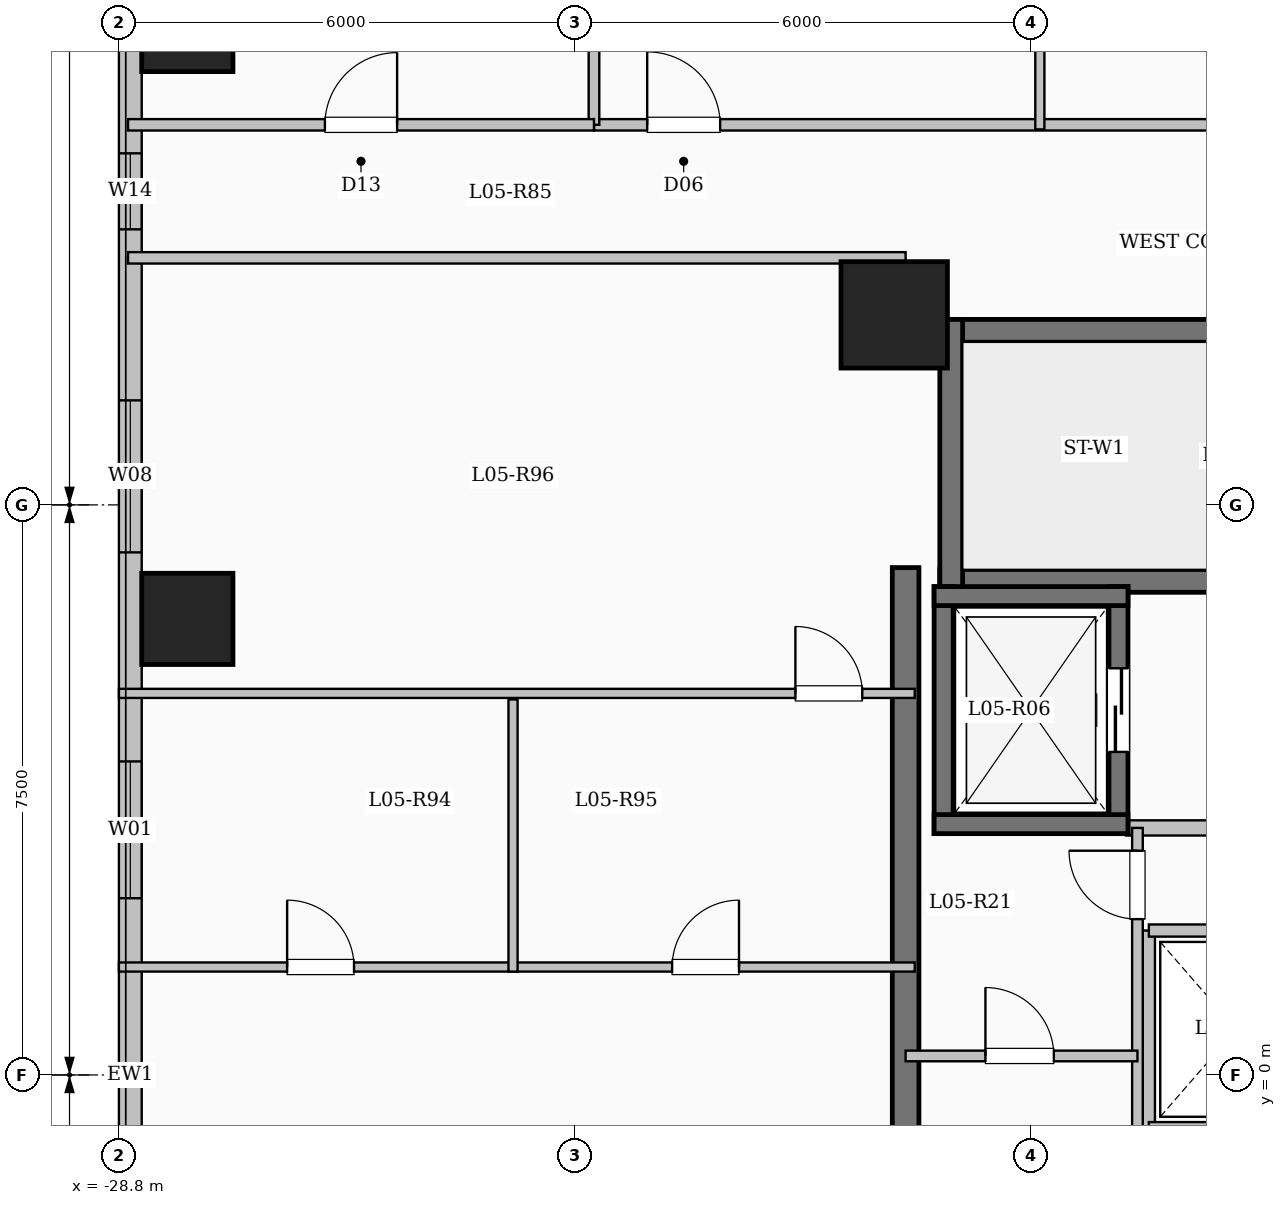
"""IFC4 building model, lengths in metres.
Left out: names, types, materials, properties, quantities, classifications, styles, units other than length and angle.
Written with IfcOpenShell. Run it as: python <this file> out.ifc"""

import sys

from ifc_helpers import new_model, si_unit, direction, frame, frame_2d, origin, origin_2d, place, context, subcontext, project, spatial, rectangle, extrude, element, fill, save


model = new_model("IFC4")
c1 = context("Model", 3, precision=1e-05, world=origin(), true_north=direction((0.0, 1.0)))
c2 = subcontext(c1, "Body", "Model", "MODEL_VIEW")
j1 = project(units=[si_unit("LENGTHUNIT", "METRE"), si_unit("PLANEANGLEUNIT", "RADIAN")], contexts=[c1])
p1 = place(None, origin())
s1 = spatial("IfcSite", under=j1, at=p1, CompositionType="ELEMENT")
p2 = place(p1, origin())
s2 = spatial("IfcBuilding", under=s1, at=p2, CompositionType="ELEMENT")
p3 = place(p2, frame((0.0, 0.0, 24.0)))
s3 = spatial("IfcBuildingStorey", under=s2, at=p3, CompositionType="ELEMENT", Elevation=24.0)
p4 = place(p3, frame((-18.6, 10.0, 0.0), z_axis=(0.0, 0.0, 1.0), x_axis=(1.0, 0.0, 0.0)))
e1 = element("IfcColumn", 1, at=p4, inside=s3, PredefinedType="COLUMN", context=c2, shape_type="SweptSolid", body=[
    extrude(rectangle(XDim=1.4, YDim=1.4, at=origin_2d()), origin(), (0.0, 0.0, 1.0), 3.35),
])
for number, where, z_axis, x_axis in (
    (2, (-27.9, 6.0, 0.0), (0.0, 0.0, 1.0), (1.0, 0.0, 0.0)),
    (3, (-27.9, 13.8, 0.0), (0.0, 0.0, 1.0), (1.0, 0.0, 0.0)),
):
    element("IfcColumn", number, at=place(p3, frame(where, z_axis=z_axis, x_axis=x_axis)), inside=s3, PredefinedType="COLUMN", context=c2, shape_type="SweptSolid", body=[
        extrude(rectangle(XDim=1.2, YDim=1.2, at=origin_2d()), origin(), (0.0, 0.0, 1.0), 3.35),
    ])
p5 = place(p3, frame((-28.65, -19.05, 0.0), z_axis=(0.0, 0.0, 1.0), x_axis=(0.0, 1.0, 0.0)))
e4 = element("IfcWall", 4, at=p5, inside=s3, PredefinedType="SOLIDWALL", context=c2, shape_type="SweptSolid", body=[
    extrude(rectangle(XDim=38.1, YDim=0.3, at=frame_2d((19.05, 0.0))), origin(), (0.0, 0.0, 1.0), 3.1),
])
p6 = place(p5, frame((3.15, 0.0, 0.9)))
e5 = element("IfcOpeningElement", 5, at=p6, cuts=e4, PredefinedType="OPENING", context=c2, shape_type="SweptSolid", body=[
    extrude(rectangle(XDim=2.4, YDim=1.8, at=frame_2d((1.2, 0.9))), frame((0.0, 0.16, 0.0), z_axis=(0.0, -1.0, 0.0), x_axis=(1.0, 0.0, 0.0)), (0.0, 0.0, 1.0), 0.32),
])
p7 = place(p5, frame((9.542, 0.0, 0.9)))
e6 = element("IfcOpeningElement", 6, at=p7, cuts=e4, PredefinedType="OPENING", context=c2, shape_type="SweptSolid", body=[
    extrude(rectangle(XDim=1.5, YDim=1.65, at=frame_2d((0.75, 0.825))), frame((0.0, 0.16, 0.0), z_axis=(0.0, -1.0, 0.0), x_axis=(1.0, 0.0, 0.0)), (0.0, 0.0, 1.0), 0.32),
])
p8 = place(p5, frame((14.95, 0.0, 0.9)))
e7 = element("IfcOpeningElement", 7, at=p8, cuts=e4, PredefinedType="OPENING", context=c2, shape_type="SweptSolid", body=[
    extrude(rectangle(XDim=2.4, YDim=1.8, at=frame_2d((1.2, 0.9))), frame((0.0, 0.16, 0.0), z_axis=(0.0, -1.0, 0.0), x_axis=(1.0, 0.0, 0.0)), (0.0, 0.0, 1.0), 0.32),
])
p9 = place(p5, frame((21.375, 0.0, 0.9)))
e8 = element("IfcOpeningElement", 8, at=p9, cuts=e4, PredefinedType="OPENING", context=c2, shape_type="SweptSolid", body=[
    extrude(rectangle(XDim=1.8, YDim=1.65, at=frame_2d((0.9, 0.825))), frame((0.0, 0.16, 0.0), z_axis=(0.0, -1.0, 0.0), x_axis=(1.0, 0.0, 0.0)), (0.0, 0.0, 1.0), 0.32),
])
p10 = place(p5, frame((25.925, 0.0, 0.9)))
e9 = element("IfcOpeningElement", 9, at=p10, cuts=e4, PredefinedType="OPENING", context=c2, shape_type="SweptSolid", body=[
    extrude(rectangle(XDim=2.0, YDim=1.7, at=frame_2d((1.0, 0.85))), frame((0.0, 0.16, 0.0), z_axis=(0.0, -1.0, 0.0), x_axis=(1.0, 0.0, 0.0)), (0.0, 0.0, 1.0), 0.32),
])
p11 = place(p5, frame((30.175, 0.0, 0.95)))
e10 = element("IfcOpeningElement", 10, at=p11, cuts=e4, PredefinedType="OPENING", context=c2, shape_type="SweptSolid", body=[
    extrude(rectangle(XDim=1.0, YDim=1.5, at=frame_2d((0.5, 0.75))), frame((0.0, 0.16, 0.0), z_axis=(0.0, -1.0, 0.0), x_axis=(1.0, 0.0, 0.0)), (0.0, 0.0, 1.0), 0.32),
])
p12 = place(p5, frame((33.85, 0.0, 0.9)))
e11 = element("IfcOpeningElement", 11, at=p12, cuts=e4, PredefinedType="OPENING", context=c2, shape_type="SweptSolid", body=[
    extrude(rectangle(XDim=2.0, YDim=1.7, at=frame_2d((1.0, 0.85))), frame((0.0, 0.16, 0.0), z_axis=(0.0, -1.0, 0.0), x_axis=(1.0, 0.0, 0.0)), (0.0, 0.0, 1.0), 0.32),
])
p13 = place(p3, frame((-18.0, 9.79, 0.0), z_axis=(0.0, 0.0, 1.0), x_axis=(1.0, 0.0, 0.0)))
e12 = element("IfcWall", 12, at=p13, inside=s3, PredefinedType="SHEAR", context=c2, shape_type="SweptSolid", body=[
    extrude(rectangle(XDim=8.0, YDim=0.3, at=frame_2d((4.0, 0.0))), origin(), (0.0, 0.0, 1.0), 3.35),
])
p14 = place(p3, frame((-18.0, 6.5, 0.0), z_axis=(0.0, 0.0, 1.0), x_axis=(1.0, 0.0, 0.0)))
e13 = element("IfcWall", 13, at=p14, inside=s3, PredefinedType="SHEAR", context=c2, shape_type="SweptSolid", body=[
    extrude(rectangle(XDim=8.0, YDim=0.3, at=frame_2d((4.0, 0.0))), origin(), (0.0, 0.0, 1.0), 3.35),
])
p15 = place(p14, frame((6.45, 0.0, 0.0)))
e14 = element("IfcOpeningElement", 14, at=p15, cuts=e13, PredefinedType="OPENING", context=c2, shape_type="SweptSolid", body=[
    extrude(rectangle(XDim=1.0, YDim=2.15, at=frame_2d((0.5, 1.075))), frame((0.0, 0.16, 0.0), z_axis=(0.0, -1.0, 0.0), x_axis=(1.0, 0.0, 0.0)), (0.0, 0.0, 1.0), 0.32),
])
p16 = place(p3, frame((-17.85, 6.35, 0.0), z_axis=(0.0, 0.0, 1.0), x_axis=(0.0, 1.0, 0.0)))
e15 = element("IfcWall", 15, at=p16, inside=s3, PredefinedType="SHEAR", context=c2, shape_type="SweptSolid", body=[
    extrude(rectangle(XDim=3.59, YDim=0.3, at=frame_2d((1.795, 0.0))), origin(), (0.0, 0.0, 1.0), 3.35),
])
p17 = place(p3, frame((-15.55, 3.25, 0.0), z_axis=(0.0, 0.0, 1.0), x_axis=(1.0, 0.0, 0.0)))
e16 = element("IfcWall", 16, at=p17, inside=s3, PredefinedType="SOLIDWALL", context=c2, shape_type="SweptSolid", body=[
    extrude(rectangle(XDim=5.4, YDim=0.2, at=frame_2d((2.7, 0.0))), origin(), (0.0, 0.0, 1.0), 3.1),
])
p18 = place(p3, frame((-17.95, 3.175, 0.0), z_axis=(0.0, 0.0, 1.0), x_axis=(0.0, 1.0, 0.0)))
e17 = element("IfcWall", 17, at=p18, inside=s3, PredefinedType="SHEAR", context=c2, shape_type="SweptSolid", body=[
    extrude(rectangle(XDim=3.25, YDim=0.25, at=frame_2d((1.625, 0.0))), origin(), (0.0, 0.0, 1.0), 3.35),
])
p19 = place(p3, frame((-15.65, 3.175, 0.0), z_axis=(0.0, 0.0, 1.0), x_axis=(0.0, 1.0, 0.0)))
e18 = element("IfcWall", 18, at=p19, inside=s3, PredefinedType="SHEAR", context=c2, shape_type="SweptSolid", body=[
    extrude(rectangle(XDim=3.25, YDim=0.25, at=frame_2d((1.625, 0.0))), origin(), (0.0, 0.0, 1.0), 3.35),
])
p20 = place(p19, frame((1.075, 0.0, 0.0)))
e19 = element("IfcOpeningElement", 19, at=p20, cuts=e18, PredefinedType="OPENING", context=c2, shape_type="SweptSolid", body=[
    extrude(rectangle(XDim=1.1, YDim=2.15, at=frame_2d((0.55, 1.075))), frame((0.0, 0.135, 0.0), z_axis=(0.0, -1.0, 0.0), x_axis=(1.0, 0.0, 0.0)), (0.0, 0.0, 1.0), 0.27),
])
for number, where, z_axis, x_axis in (
    (20, (-18.075, 3.3, 0.0), (0.0, 0.0, 1.0), (1.0, 0.0, 0.0)),
    (21, (-18.075, 6.3, 0.0), (0.0, 0.0, 1.0), (1.0, 0.0, 0.0)),
):
    element("IfcWall", number, at=place(p3, frame(where, z_axis=z_axis, x_axis=x_axis)), inside=s3, PredefinedType="SHEAR", context=c2, shape_type="SweptSolid", body=[
        extrude(rectangle(XDim=2.55, YDim=0.25, at=frame_2d((1.275, 0.0))), origin(), (0.0, 0.0, 1.0), 3.35),
    ])
p21 = place(p3, frame((-15.25, -0.7, 0.0), z_axis=(0.0, 0.0, 1.0), x_axis=(0.0, 1.0, 0.0)))
e22 = element("IfcWall", 22, at=p21, inside=s3, PredefinedType="SOLIDWALL", context=c2, shape_type="SweptSolid", body=[
    extrude(rectangle(XDim=2.6, YDim=0.16, at=frame_2d((1.3, 0.0))), origin(), (0.0, 0.0, 1.0), 3.1),
])
for number, where, z_axis, x_axis in (
    (23, (-15.25, -0.7, 0.0), (0.0, 0.0, 1.0), (1.0, 0.0, 0.0)),
    (24, (-15.25, 1.9, 0.0), (0.0, 0.0, 1.0), (1.0, 0.0, 0.0)),
):
    element("IfcWall", number, at=place(p3, frame(where, z_axis=z_axis, x_axis=x_axis)), inside=s3, PredefinedType="SOLIDWALL", context=c2, shape_type="SweptSolid", body=[
        extrude(rectangle(XDim=2.3, YDim=0.16, at=frame_2d((1.15, 0.0))), origin(), (0.0, 0.0, 1.0), 3.1),
    ])
p22 = place(p3, frame((-18.45, -7.375, 0.0), z_axis=(0.0, 0.0, 1.0), x_axis=(0.0, 1.0, 0.0)))
e25 = element("IfcWall", 25, at=p22, inside=s3, PredefinedType="SHEAR", context=c2, shape_type="SweptSolid", body=[
    extrude(rectangle(XDim=14.05, YDim=0.35, at=frame_2d((7.025, 0.0))), origin(), (0.0, 0.0, 1.0), 3.35),
])
p23 = place(p3, frame((-15.4, -7.2, 0.0), z_axis=(0.0, 0.0, 1.0), x_axis=(0.0, 1.0, 0.0)))
e26 = element("IfcWall", 26, at=p23, inside=s3, PredefinedType="PARTITIONING", context=c2, shape_type="SweptSolid", body=[
    extrude(rectangle(XDim=10.45, YDim=0.14, at=frame_2d((5.225, 0.0))), origin(), (0.0, 0.0, 1.0), 3.1),
])
p24 = place(p23, frame((9.25, 0.0, 0.0)))
e27 = element("IfcOpeningElement", 27, at=p24, cuts=e26, PredefinedType="OPENING", context=c2, shape_type="SweptSolid", body=[
    extrude(rectangle(XDim=0.9, YDim=2.08, at=frame_2d((0.45, 1.04))), frame((0.0, 0.08, 0.0), z_axis=(0.0, -1.0, 0.0), x_axis=(1.0, 0.0, 0.0)), (0.0, 0.0, 1.0), 0.16),
])
p25 = place(p3, frame((-18.45, 0.25, 0.0), z_axis=(0.0, 0.0, 1.0), x_axis=(1.0, 0.0, 0.0)))
e28 = element("IfcWall", 28, at=p25, inside=s3, PredefinedType="PARTITIONING", context=c2, shape_type="SweptSolid", body=[
    extrude(rectangle(XDim=3.05, YDim=0.14, at=frame_2d((1.525, 0.0))), origin(), (0.0, 0.0, 1.0), 3.1),
])
p26 = place(p25, frame((1.05, 0.0, 0.0)))
e29 = element("IfcOpeningElement", 29, at=p26, cuts=e28, PredefinedType="OPENING", context=c2, shape_type="SweptSolid", body=[
    extrude(rectangle(XDim=0.9, YDim=2.08, at=frame_2d((0.45, 1.04))), frame((0.0, 0.08, 0.0), z_axis=(0.0, -1.0, 0.0), x_axis=(1.0, 0.0, 0.0)), (0.0, 0.0, 1.0), 0.16),
])
p27 = place(p3, frame((-22.55, 12.5, 0.0), z_axis=(0.0, 0.0, 1.0), x_axis=(1.0, 0.0, 0.0)))
e30 = element("IfcWall", 30, at=p27, inside=s3, PredefinedType="PARTITIONING", context=c2, shape_type="SweptSolid", body=[
    extrude(rectangle(XDim=18.7, YDim=0.15, at=frame_2d((9.35, 0.0))), origin(), (0.0, 0.0, 1.0), 3.1),
])
p28 = place(p27, frame((0.7, 0.0, 0.0)))
e31 = element("IfcOpeningElement", 31, at=p28, cuts=e30, PredefinedType="OPENING", context=c2, shape_type="SweptSolid", body=[
    extrude(rectangle(XDim=0.96, YDim=2.15, at=frame_2d((0.48, 1.075))), frame((0.0, 0.085, 0.0), z_axis=(0.0, -1.0, 0.0), x_axis=(1.0, 0.0, 0.0)), (0.0, 0.0, 1.0), 0.17),
])
p29 = place(p27, frame((11.326, 0.0, 0.0)))
e32 = element("IfcOpeningElement", 32, at=p29, cuts=e30, PredefinedType="OPENING", context=c2, shape_type="SweptSolid", body=[
    extrude(rectangle(XDim=0.96, YDim=2.15, at=frame_2d((0.48, 1.075))), frame((0.0, 0.085, 0.0), z_axis=(0.0, -1.0, 0.0), x_axis=(1.0, 0.0, 0.0)), (0.0, 0.0, 1.0), 0.17),
])
p30 = place(p3, frame((-16.684, 12.44, 0.0), z_axis=(0.0, 0.0, 1.0), x_axis=(0.0, 1.0, 0.0)))
e33 = element("IfcWall", 33, at=p30, inside=s3, PredefinedType="PARTITIONING", context=c2, shape_type="SweptSolid", body=[
    extrude(rectangle(XDim=3.21, YDim=0.12, at=frame_2d((1.605, 0.0))), origin(), (0.0, 0.0, 1.0), 3.1),
])
p31 = place(p30, frame((1.195, 0.0, 0.0)))
e34 = element("IfcOpeningElement", 34, at=p31, cuts=e33, PredefinedType="OPENING", context=c2, shape_type="SweptSolid", body=[
    extrude(rectangle(XDim=0.88, YDim=2.1, at=frame_2d((0.44, 1.05))), frame((0.0, 0.07, 0.0), z_axis=(0.0, -1.0, 0.0), x_axis=(1.0, 0.0, 0.0)), (0.0, 0.0, 1.0), 0.14),
])
p32 = place(p3, frame((-28.68, 10.75, 0.0), z_axis=(0.0, 0.0, 1.0), x_axis=(1.0, 0.0, 0.0)))
e35 = element("IfcWall", 35, at=p32, inside=s3, PredefinedType="PARTITIONING", context=c2, shape_type="SweptSolid", body=[
    extrude(rectangle(XDim=10.23, YDim=0.15, at=frame_2d((5.115, 0.0))), origin(), (0.0, 0.0, 1.0), 3.1),
])
p33 = place(p3, frame((-22.55, 12.5, 0.0), z_axis=(0.0, 0.0, 1.0), x_axis=(0.0, 1.0, 0.0)))
e36 = element("IfcWall", 36, at=p33, inside=s3, PredefinedType="PARTITIONING", context=c2, shape_type="SweptSolid", body=[
    extrude(rectangle(XDim=6.55, YDim=0.14, at=frame_2d((3.275, 0.0))), origin(), (0.0, 0.0, 1.0), 3.1),
])
p34 = place(p3, frame((-28.68, 12.5, 0.0), z_axis=(0.0, 0.0, 1.0), x_axis=(1.0, 0.0, 0.0)))
e37 = element("IfcWall", 37, at=p34, inside=s3, PredefinedType="PARTITIONING", context=c2, shape_type="SweptSolid", body=[
    extrude(rectangle(XDim=6.13, YDim=0.15, at=frame_2d((3.065, 0.0))), origin(), (0.0, 0.0, 1.0), 3.1),
])
p35 = place(p34, frame((2.59, 0.0, 0.0)))
e38 = element("IfcOpeningElement", 38, at=p35, cuts=e37, PredefinedType="OPENING", context=c2, shape_type="SweptSolid", body=[
    extrude(rectangle(XDim=0.95, YDim=2.15, at=frame_2d((0.475, 1.075))), frame((0.0, 0.085, 0.0), z_axis=(0.0, -1.0, 0.0), x_axis=(1.0, 0.0, 0.0)), (0.0, 0.0, 1.0), 0.17),
])
p36 = place(p3, frame((-28.8, 1.42, 0.0), z_axis=(0.0, 0.0, 1.0), x_axis=(1.0, 0.0, 0.0)))
e39 = element("IfcWall", 39, at=p36, inside=s3, PredefinedType="PARTITIONING", context=c2, shape_type="SweptSolid", body=[
    extrude(rectangle(XDim=10.47, YDim=0.12, at=frame_2d((5.235, 0.0))), origin(), (0.0, 0.0, 1.0), 3.1),
])
p37 = place(p36, frame((2.213, 0.0, 0.0)))
e40 = element("IfcOpeningElement", 40, at=p37, cuts=e39, PredefinedType="OPENING", context=c2, shape_type="SweptSolid", body=[
    extrude(rectangle(XDim=0.88, YDim=2.1, at=frame_2d((0.44, 1.05))), frame((0.0, 0.07, 0.0), z_axis=(0.0, -1.0, 0.0), x_axis=(1.0, 0.0, 0.0)), (0.0, 0.0, 1.0), 0.14),
])
p38 = place(p36, frame((7.278, 0.0, 0.0)))
e41 = element("IfcOpeningElement", 41, at=p38, cuts=e39, PredefinedType="OPENING", context=c2, shape_type="SweptSolid", body=[
    extrude(rectangle(XDim=0.88, YDim=2.1, at=frame_2d((0.44, 1.05))), frame((0.0, 0.07, 0.0), z_axis=(0.0, -1.0, 0.0), x_axis=(1.0, 0.0, 0.0)), (0.0, 0.0, 1.0), 0.14),
])
p39 = place(p3, frame((-28.8, 5.02, 0.0), z_axis=(0.0, 0.0, 1.0), x_axis=(1.0, 0.0, 0.0)))
e42 = element("IfcWall", 42, at=p39, inside=s3, PredefinedType="PARTITIONING", context=c2, shape_type="SweptSolid", body=[
    extrude(rectangle(XDim=10.47, YDim=0.12, at=frame_2d((5.235, 0.0))), origin(), (0.0, 0.0, 1.0), 3.1),
])
p40 = place(p39, frame((8.9, 0.0, 0.0)))
e43 = element("IfcOpeningElement", 43, at=p40, cuts=e42, PredefinedType="OPENING", context=c2, shape_type="SweptSolid", body=[
    extrude(rectangle(XDim=0.88, YDim=2.1, at=frame_2d((0.44, 1.05))), frame((0.0, 0.07, 0.0), z_axis=(0.0, -1.0, 0.0), x_axis=(1.0, 0.0, 0.0)), (0.0, 0.0, 1.0), 0.14),
])
p41 = place(p3, frame((-23.615, 1.36, 0.0), z_axis=(0.0, 0.0, 1.0), x_axis=(0.0, 1.0, 0.0)))
e44 = element("IfcWall", 44, at=p41, inside=s3, PredefinedType="PARTITIONING", context=c2, shape_type="SweptSolid", body=[
    extrude(rectangle(XDim=3.58, YDim=0.12, at=frame_2d((1.79, 0.0))), origin(), (0.0, 0.0, 1.0), 3.1),
])
p42 = place(p9, origin())
e45 = element("IfcWindow", 45, at=p42, inside=s3, PartitioningType="SINGLE_PANEL", PredefinedType="WINDOW", context=c2, shape_type="SweptSolid", body=[
    extrude(rectangle(XDim=1.8, YDim=1.65, at=frame_2d((0.9, 0.825))), frame((0.0, 0.03, 0.0), z_axis=(0.0, -1.0, 0.0), x_axis=(1.0, 0.0, 0.0)), (0.0, 0.0, 1.0), 0.06),
])
fill(e8, e45)
p43 = place(p10, origin())
e46 = element("IfcWindow", 46, at=p43, inside=s3, PartitioningType="SINGLE_PANEL", PredefinedType="WINDOW", context=c2, shape_type="SweptSolid", body=[
    extrude(rectangle(XDim=2.0, YDim=1.7, at=frame_2d((1.0, 0.85))), frame((0.0, 0.03, 0.0), z_axis=(0.0, -1.0, 0.0), x_axis=(1.0, 0.0, 0.0)), (0.0, 0.0, 1.0), 0.06),
])
fill(e9, e46)
p44 = place(p11, origin())
e47 = element("IfcWindow", 47, at=p44, inside=s3, PartitioningType="SINGLE_PANEL", PredefinedType="WINDOW", context=c2, shape_type="SweptSolid", body=[
    extrude(rectangle(XDim=1.0, YDim=1.5, at=frame_2d((0.5, 0.75))), frame((0.0, 0.03, 0.0), z_axis=(0.0, -1.0, 0.0), x_axis=(1.0, 0.0, 0.0)), (0.0, 0.0, 1.0), 0.06),
])
fill(e10, e47)
p45 = place(p20, origin())
e48 = element("IfcDoor", 48, at=p45, inside=s3, OperationType="SLIDING_TO_LEFT", PredefinedType="DOOR", context=c2, shape_type="SweptSolid", body=[
    extrude(rectangle(XDim=1.1, YDim=2.15, at=frame_2d((0.55, 1.075))), frame((0.0, 0.025, 0.0), z_axis=(0.0, -1.0, 0.0), x_axis=(1.0, 0.0, 0.0)), (0.0, 0.0, 1.0), 0.05),
])
fill(e19, e48)
p46 = place(p24, origin())
e49 = element("IfcDoor", 49, at=p46, inside=s3, OperationType="SINGLE_SWING_RIGHT", PredefinedType="DOOR", context=c2, shape_type="SweptSolid", body=[
    extrude(rectangle(XDim=0.9, YDim=2.08, at=frame_2d((0.45, 1.04))), frame((0.0, 0.025, 0.0), z_axis=(0.0, -1.0, 0.0), x_axis=(1.0, 0.0, 0.0)), (0.0, 0.0, 1.0), 0.05),
])
fill(e27, e49)
p47 = place(p26, origin())
e50 = element("IfcDoor", 50, at=p47, inside=s3, OperationType="SINGLE_SWING_LEFT", PredefinedType="DOOR", context=c2, shape_type="SweptSolid", body=[
    extrude(rectangle(XDim=0.9, YDim=2.08, at=frame_2d((0.45, 1.04))), frame((0.0, 0.025, 0.0), z_axis=(0.0, -1.0, 0.0), x_axis=(1.0, 0.0, 0.0)), (0.0, 0.0, 1.0), 0.05),
])
fill(e29, e50)
p48 = place(p28, origin())
e51 = element("IfcDoor", 51, at=p48, inside=s3, OperationType="SINGLE_SWING_LEFT", PredefinedType="DOOR", context=c2, shape_type="SweptSolid", body=[
    extrude(rectangle(XDim=0.96, YDim=2.15, at=frame_2d((0.48, 1.075))), frame((0.0, 0.025, 0.0), z_axis=(0.0, -1.0, 0.0), x_axis=(1.0, 0.0, 0.0)), (0.0, 0.0, 1.0), 0.05),
])
fill(e31, e51)
p49 = place(p35, origin())
e52 = element("IfcDoor", 52, at=p49, inside=s3, OperationType="SINGLE_SWING_RIGHT", PredefinedType="DOOR", context=c2, shape_type="SweptSolid", body=[
    extrude(rectangle(XDim=0.95, YDim=2.15, at=frame_2d((0.475, 1.075))), frame((0.0, 0.025, 0.0), z_axis=(0.0, -1.0, 0.0), x_axis=(1.0, 0.0, 0.0)), (0.0, 0.0, 1.0), 0.05),
])
fill(e38, e52)
p50 = place(p37, origin())
e53 = element("IfcDoor", 53, at=p50, inside=s3, OperationType="SINGLE_SWING_LEFT", PredefinedType="DOOR", context=c2, shape_type="SweptSolid", body=[
    extrude(rectangle(XDim=0.88, YDim=2.1, at=frame_2d((0.44, 1.05))), frame((0.0, 0.025, 0.0), z_axis=(0.0, -1.0, 0.0), x_axis=(1.0, 0.0, 0.0)), (0.0, 0.0, 1.0), 0.05),
])
fill(e40, e53)
p51 = place(p38, origin())
e54 = element("IfcDoor", 54, at=p51, inside=s3, OperationType="SINGLE_SWING_RIGHT", PredefinedType="DOOR", context=c2, shape_type="SweptSolid", body=[
    extrude(rectangle(XDim=0.88, YDim=2.1, at=frame_2d((0.44, 1.05))), frame((0.0, 0.025, 0.0), z_axis=(0.0, -1.0, 0.0), x_axis=(1.0, 0.0, 0.0)), (0.0, 0.0, 1.0), 0.05),
])
fill(e41, e54)
p52 = place(p40, origin())
e55 = element("IfcDoor", 55, at=p52, inside=s3, OperationType="SINGLE_SWING_LEFT", PredefinedType="DOOR", context=c2, shape_type="SweptSolid", body=[
    extrude(rectangle(XDim=0.88, YDim=2.1, at=frame_2d((0.44, 1.05))), frame((0.0, 0.025, 0.0), z_axis=(0.0, -1.0, 0.0), x_axis=(1.0, 0.0, 0.0)), (0.0, 0.0, 1.0), 0.05),
])
fill(e43, e55)
save(model, sys.argv[1])
